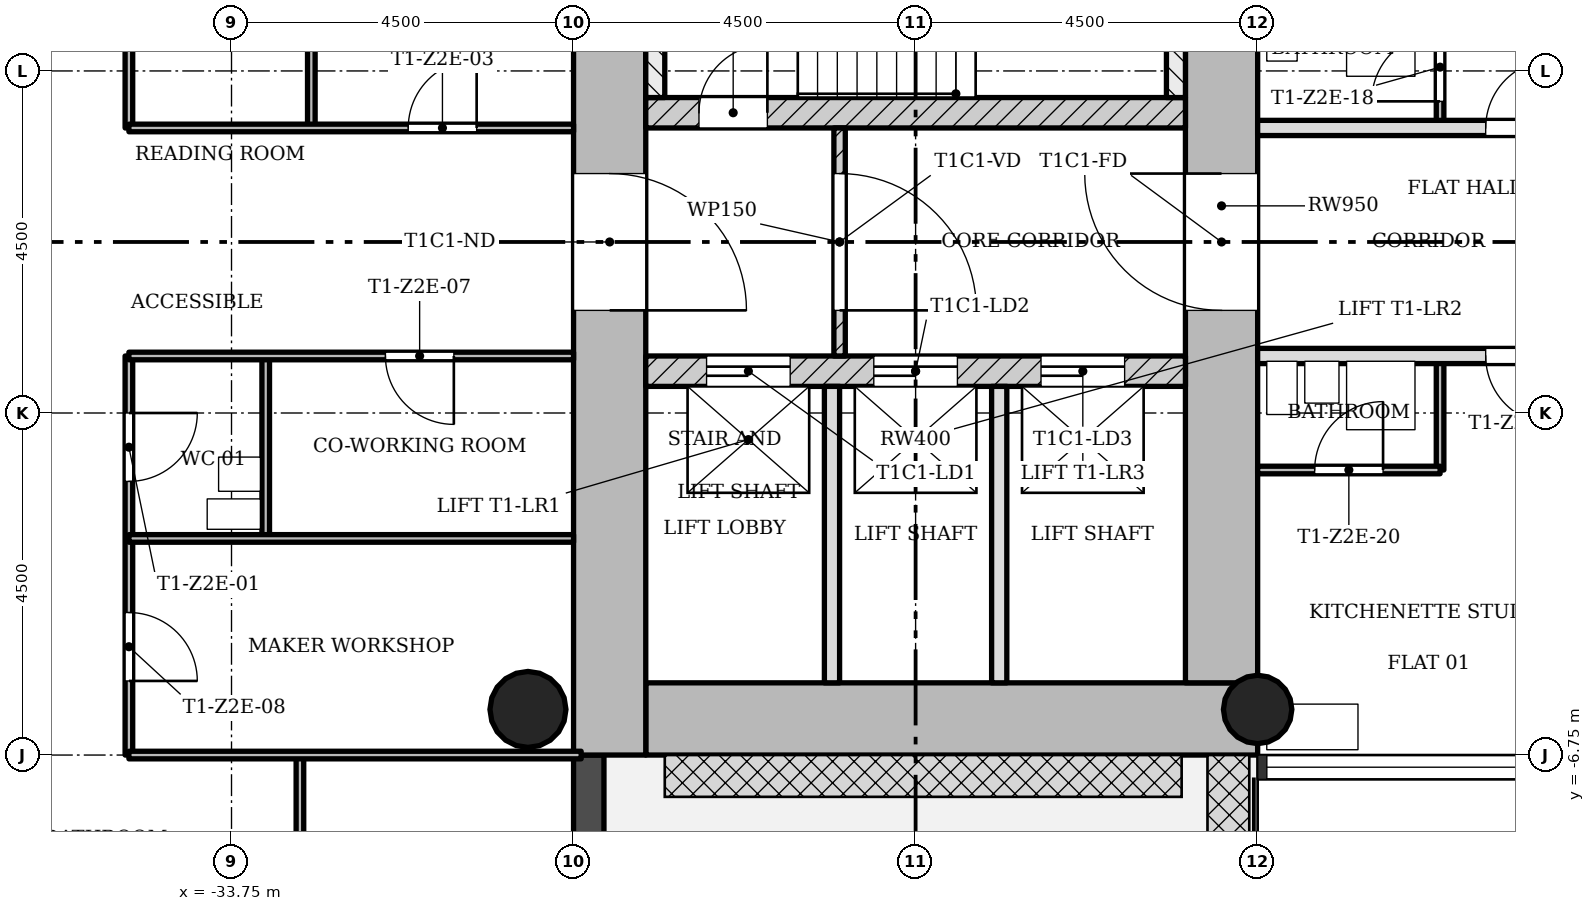
"""IFC4 building model, lengths in metres.
Left out: names, types, materials, properties, quantities, classifications, styles, units other than length and angle.
Written with IfcOpenShell. Run it as: python <this file> out.ifc"""

import sys

from ifc_helpers import new_model, si_unit, direction, frame, frame_2d, origin, origin_2d, place, context, subcontext, project, spatial, rectangle, hollow_circle, extrude, element, fill, save


model = new_model("IFC4")
c1 = context("Model", 3, precision=1e-05, world=origin(), true_north=direction((0.0, 1.0)))
c2 = subcontext(c1, "Body", "Model", "MODEL_VIEW")
j1 = project(units=[si_unit("LENGTHUNIT", "METRE"), si_unit("PLANEANGLEUNIT", "RADIAN")], contexts=[c1])
p1 = place(None, origin())
s1 = spatial("IfcSite", under=j1, at=p1, CompositionType="ELEMENT")
p2 = place(p1, origin())
s2 = spatial("IfcBuilding", under=s1, at=p2, CompositionType="ELEMENT")
p3 = place(p2, frame((0.0, 0.0, 103.8)))
s3 = spatial("IfcBuildingStorey", under=s2, at=p3, CompositionType="ELEMENT", Elevation=103.8)
p4 = place(p3, frame((-28.3, -6.275, 0.0), z_axis=(0.0, 0.0, 1.0), x_axis=(1.0, 0.0, 0.0)))
e1 = element("IfcWall", 1, at=p4, inside=s3, PredefinedType="SHEAR", context=c2, shape_type="SweptSolid", body=[
    extrude(rectangle(XDim=8.05, YDim=0.95, at=frame_2d((4.025, 0.0))), origin(), (0.0, 0.0, 1.0), 3.4),
])
p5 = place(p3, frame((-20.725, -5.8, 0.0), z_axis=(0.0, 0.0, 1.0), x_axis=(0.0, 1.0, 0.0)))
e2 = element("IfcWall", 2, at=p5, inside=s3, PredefinedType="SHEAR", context=c2, shape_type="SweptSolid", body=[
    extrude(rectangle(XDim=12.55, YDim=0.95, at=frame_2d((6.275, 0.0))), origin(), (0.0, 0.0, 1.0), 3.4),
])
p6 = place(p5, frame((4.9, 0.0, 0.0)))
e3 = element("IfcOpeningElement", 3, at=p6, cuts=e2, PredefinedType="OPENING", context=c2, shape_type="SweptSolid", body=[
    extrude(rectangle(XDim=1.8, YDim=2.1, at=frame_2d((0.9, 1.05))), frame((0.0, 0.485, 0.0), z_axis=(0.0, -1.0, 0.0), x_axis=(1.0, 0.0, 0.0)), (0.0, 0.0, 1.0), 0.97),
])
p7 = place(p3, frame((-28.775, 5.8, 0.0), z_axis=(0.0, 0.0, 1.0), x_axis=(0.0, -1.0, 0.0)))
e4 = element("IfcWall", 4, at=p7, inside=s3, PredefinedType="SHEAR", context=c2, shape_type="SweptSolid", body=[
    extrude(rectangle(XDim=12.55, YDim=0.95, at=frame_2d((6.275, 0.0))), origin(), (0.0, 0.0, 1.0), 3.4),
])
p8 = place(p7, frame((4.9, 0.0, 0.0)))
e5 = element("IfcOpeningElement", 5, at=p8, cuts=e4, PredefinedType="OPENING", context=c2, shape_type="SweptSolid", body=[
    extrude(rectangle(XDim=1.8, YDim=2.1, at=frame_2d((0.9, 1.05))), frame((0.0, 0.485, 0.0), z_axis=(0.0, -1.0, 0.0), x_axis=(1.0, 0.0, 0.0)), (0.0, 0.0, 1.0), 0.97),
])
p9 = place(p3, frame((-28.3, -1.7, 0.0), z_axis=(0.0, 0.0, 1.0), x_axis=(1.0, 0.0, 0.0)))
e6 = element("IfcWall", 6, at=p9, inside=s3, PredefinedType="SHEAR", context=c2, shape_type="SweptSolid", body=[
    extrude(rectangle(XDim=7.1, YDim=0.4, at=frame_2d((3.55, 0.0))), origin(), (0.0, 0.0, 1.0), 3.4),
])
p10 = place(p9, frame((0.8, 0.0, 0.0)))
e7 = element("IfcOpeningElement", 7, at=p10, cuts=e6, PredefinedType="OPENING", context=c2, shape_type="SweptSolid", body=[
    extrude(rectangle(XDim=1.1, YDim=2.1, at=frame_2d((0.55, 1.05))), frame((0.0, 0.21, 0.0), z_axis=(0.0, -1.0, 0.0), x_axis=(1.0, 0.0, 0.0)), (0.0, 0.0, 1.0), 0.42),
])
p11 = place(p9, frame((3.0, 0.0, 0.0)))
e8 = element("IfcOpeningElement", 8, at=p11, cuts=e6, PredefinedType="OPENING", context=c2, shape_type="SweptSolid", body=[
    extrude(rectangle(XDim=1.1, YDim=2.1, at=frame_2d((0.55, 1.05))), frame((0.0, 0.21, 0.0), z_axis=(0.0, -1.0, 0.0), x_axis=(1.0, 0.0, 0.0)), (0.0, 0.0, 1.0), 0.42),
])
p12 = place(p9, frame((5.2, 0.0, 0.0)))
e9 = element("IfcOpeningElement", 9, at=p12, cuts=e6, PredefinedType="OPENING", context=c2, shape_type="SweptSolid", body=[
    extrude(rectangle(XDim=1.1, YDim=2.1, at=frame_2d((0.55, 1.05))), frame((0.0, 0.21, 0.0), z_axis=(0.0, -1.0, 0.0), x_axis=(1.0, 0.0, 0.0)), (0.0, 0.0, 1.0), 0.42),
])
p13 = place(p3, frame((-28.3, 1.7, 0.0), z_axis=(0.0, 0.0, 1.0), x_axis=(1.0, 0.0, 0.0)))
e10 = element("IfcWall", 10, at=p13, inside=s3, PredefinedType="SHEAR", context=c2, shape_type="SweptSolid", body=[
    extrude(rectangle(XDim=7.1, YDim=0.4, at=frame_2d((3.55, 0.0))), origin(), (0.0, 0.0, 1.0), 3.4),
])
p14 = place(p13, frame((0.7, 0.0, 0.0)))
e11 = element("IfcOpeningElement", 11, at=p14, cuts=e10, PredefinedType="OPENING", context=c2, shape_type="SweptSolid", body=[
    extrude(rectangle(XDim=0.9, YDim=2.1, at=frame_2d((0.45, 1.05))), frame((0.0, 0.21, 0.0), z_axis=(0.0, -1.0, 0.0), x_axis=(1.0, 0.0, 0.0)), (0.0, 0.0, 1.0), 0.42),
])
p15 = place(p3, frame((-20.25, -6.15, 0.0), z_axis=(0.0, 0.0, 1.0), x_axis=(1.0, 0.0, 0.0)))
e12 = element("IfcColumn", 12, at=p15, inside=s3, PredefinedType="COLUMN", context=c2, shape_type="SweptSolid", body=[
    extrude(hollow_circle(Radius=0.45, WallThickness=0.032, at=origin_2d()), origin(), (0.0, 0.0, 1.0), 3.4),
])
p16 = place(p3, frame((-29.85, -6.15, 0.0), z_axis=(0.0, 0.0, 1.0), x_axis=(1.0, 0.0, 0.0)))
e13 = element("IfcColumn", 13, at=p16, inside=s3, PredefinedType="COLUMN", context=c2, shape_type="SweptSolid", body=[
    extrude(hollow_circle(Radius=0.5, WallThickness=0.036, at=origin_2d()), origin(), (0.0, 0.0, 1.0), 3.4),
])
p17 = place(p3, frame((-29.05, -11.25, -0.02), z_axis=(0.0, 0.0, 1.0), x_axis=(0.0, 1.0, 0.0)))
e14 = element("IfcWall", 14, at=p17, inside=s3, PredefinedType="STANDARD", context=c2, shape_type="SweptSolid", body=[
    extrude(rectangle(XDim=4.5, YDim=0.4, at=frame_2d((2.25, 0.0))), origin(), (0.0, 0.0, 1.0), 3.12),
])
p18 = place(p17, frame((1.35, 0.0, 0.02)))
e15 = element("IfcOpeningElement", 15, at=p18, cuts=e14, PredefinedType="OPENING", context=c2, shape_type="SweptSolid", body=[
    extrude(rectangle(XDim=1.8, YDim=2.1, at=frame_2d((0.9, 1.05))), frame((0.0, 0.21, 0.0), z_axis=(0.0, -1.0, 0.0), x_axis=(1.0, 0.0, 0.0)), (0.0, 0.0, 1.0), 0.42),
])
p19 = place(p3, frame((-25.75, -1.5, 0.0), z_axis=(0.0, 0.0, 1.0), x_axis=(0.0, 1.0, 0.0)))
e16 = element("IfcWall", 16, at=p19, inside=s3, PredefinedType="PARTITIONING", context=c2, shape_type="SweptSolid", body=[
    extrude(rectangle(XDim=3.0, YDim=0.15, at=frame_2d((1.5, 0.0))), origin(), (0.0, 0.0, 1.0), 3.0),
])
p20 = place(p19, frame((0.6, 0.0, 0.0)))
e17 = element("IfcOpeningElement", 17, at=p20, cuts=e16, PredefinedType="OPENING", context=c2, shape_type="SweptSolid", body=[
    extrude(rectangle(XDim=1.8, YDim=2.1, at=frame_2d((0.9, 1.05))), frame((0.0, 0.085, 0.0), z_axis=(0.0, -1.0, 0.0), x_axis=(1.0, 0.0, 0.0)), (0.0, 0.0, 1.0), 0.17),
])
for number, where, z_axis, x_axis in (
    (18, (-25.85, -5.8, 0.0), (0.0, 0.0, 1.0), (0.0, 1.0, 0.0)),
    (19, (-23.65, -5.8, 0.0), (0.0, 0.0, 1.0), (0.0, 1.0, 0.0)),
):
    element("IfcWall", number, at=place(p3, frame(where, z_axis=z_axis, x_axis=x_axis)), inside=s3, PredefinedType="SOLIDWALL", context=c2, shape_type="SweptSolid", body=[
        extrude(rectangle(XDim=3.9, YDim=0.2, at=frame_2d((1.95, 0.0))), origin(), (0.0, 0.0, 1.0), 3.0),
    ])
p21 = place(p3, frame((-35.1, -6.75, 0.0), z_axis=(0.0, 0.0, 1.0), x_axis=(0.0, 1.0, 0.0)))
e20 = element("IfcWall", 20, at=p21, inside=s3, PredefinedType="PARTITIONING", context=c2, shape_type="SweptSolid", body=[
    extrude(rectangle(XDim=5.25, YDim=0.1, at=frame_2d((2.625, 0.0))), origin(), (0.0, 0.0, 1.0), 3.0),
])
p22 = place(p21, frame((3.6, 0.0, 0.0)))
e21 = element("IfcOpeningElement", 21, at=p22, cuts=e20, PredefinedType="OPENING", context=c2, shape_type="SweptSolid", body=[
    extrude(rectangle(XDim=0.9, YDim=2.1, at=frame_2d((0.45, 1.05))), frame((0.0, 0.06, 0.0), z_axis=(0.0, -1.0, 0.0), x_axis=(1.0, 0.0, 0.0)), (0.0, 0.0, 1.0), 0.12),
])
p23 = place(p21, frame((0.975, 0.0, 0.0)))
e22 = element("IfcOpeningElement", 22, at=p23, cuts=e20, PredefinedType="OPENING", context=c2, shape_type="SweptSolid", body=[
    extrude(rectangle(XDim=0.9, YDim=2.1, at=frame_2d((0.45, 1.05))), frame((0.0, 0.06, 0.0), z_axis=(0.0, -1.0, 0.0), x_axis=(1.0, 0.0, 0.0)), (0.0, 0.0, 1.0), 0.12),
])
p24 = place(p3, frame((-35.1, 1.5, 0.0), z_axis=(0.0, 0.0, 1.0), x_axis=(0.0, 1.0, 0.0)))
e23 = element("IfcWall", 23, at=p24, inside=s3, PredefinedType="PARTITIONING", context=c2, shape_type="SweptSolid", body=[
    extrude(rectangle(XDim=5.25, YDim=0.1, at=frame_2d((2.625, 0.0))), origin(), (0.0, 0.0, 1.0), 3.0),
])
p25 = place(p24, frame((2.175, 0.0, 0.0)))
e24 = element("IfcOpeningElement", 24, at=p25, cuts=e23, PredefinedType="OPENING", context=c2, shape_type="SweptSolid", body=[
    extrude(rectangle(XDim=0.9, YDim=2.1, at=frame_2d((0.45, 1.05))), frame((0.0, 0.06, 0.0), z_axis=(0.0, -1.0, 0.0), x_axis=(1.0, 0.0, 0.0)), (0.0, 0.0, 1.0), 0.12),
])
p26 = place(p3, frame((-33.3, -3.9, 0.0), z_axis=(0.0, 0.0, 1.0), x_axis=(0.0, 1.0, 0.0)))
e25 = element("IfcWall", 25, at=p26, inside=s3, PredefinedType="PARTITIONING", context=c2, shape_type="SweptSolid", body=[
    extrude(rectangle(XDim=2.4, YDim=0.1, at=frame_2d((1.2, 0.0))), origin(), (0.0, 0.0, 1.0), 3.0),
])
p27 = place(p3, frame((-32.85, -15.75, 0.0), z_axis=(0.0, 0.0, 1.0), x_axis=(0.0, 1.0, 0.0)))
e26 = element("IfcWall", 26, at=p27, inside=s3, PredefinedType="PARTITIONING", context=c2, shape_type="SweptSolid", body=[
    extrude(rectangle(XDim=9.0, YDim=0.1, at=frame_2d((4.5, 0.0))), origin(), (0.0, 0.0, 1.0), 3.0),
])
p28 = place(p27, frame((5.55, 0.0, 0.0)))
e27 = element("IfcOpeningElement", 27, at=p28, cuts=e26, PredefinedType="OPENING", context=c2, shape_type="SweptSolid", body=[
    extrude(rectangle(XDim=0.9, YDim=2.1, at=frame_2d((0.45, 1.05))), frame((0.0, 0.06, 0.0), z_axis=(0.0, -1.0, 0.0), x_axis=(1.0, 0.0, 0.0)), (0.0, 0.0, 1.0), 0.12),
])
p29 = place(p3, frame((-32.7, 1.5, 0.0), z_axis=(0.0, 0.0, 1.0), x_axis=(0.0, 1.0, 0.0)))
e28 = element("IfcWall", 28, at=p29, inside=s3, PredefinedType="PARTITIONING", context=c2, shape_type="SweptSolid", body=[
    extrude(rectangle(XDim=5.25, YDim=0.1, at=frame_2d((2.625, 0.0))), origin(), (0.0, 0.0, 1.0), 3.0),
])
p30 = place(p3, frame((-17.85, -3.0, 0.0), z_axis=(0.0, 0.0, 1.0), x_axis=(0.0, 1.0, 0.0)))
e29 = element("IfcWall", 29, at=p30, inside=s3, PredefinedType="PARTITIONING", context=c2, shape_type="SweptSolid", body=[
    extrude(rectangle(XDim=1.5, YDim=0.1, at=frame_2d((0.75, 0.0))), origin(), (0.0, 0.0, 1.0), 3.0),
])
p31 = place(p3, frame((-17.85, 1.5, 0.0), z_axis=(0.0, 0.0, 1.0), x_axis=(0.0, 1.0, 0.0)))
e30 = element("IfcWall", 30, at=p31, inside=s3, PredefinedType="PARTITIONING", context=c2, shape_type="SweptSolid", body=[
    extrude(rectangle(XDim=1.65, YDim=0.1, at=frame_2d((0.825, 0.0))), origin(), (0.0, 0.0, 1.0), 3.0),
])
p32 = place(p31, frame((0.35, 0.0, 0.0)))
e31 = element("IfcOpeningElement", 31, at=p32, cuts=e30, PredefinedType="OPENING", context=c2, shape_type="SweptSolid", body=[
    extrude(rectangle(XDim=0.9, YDim=2.1, at=frame_2d((0.45, 1.05))), frame((0.0, 0.06, 0.0), z_axis=(0.0, -1.0, 0.0), x_axis=(1.0, 0.0, 0.0)), (0.0, 0.0, 1.0), 0.12),
])
p33 = place(p3, frame((-35.1, -6.75, 0.0), z_axis=(0.0, 0.0, 1.0), x_axis=(1.0, 0.0, 0.0)))
e32 = element("IfcWall", 32, at=p33, inside=s3, PredefinedType="PARTITIONING", context=c2, shape_type="SweptSolid", body=[
    extrude(rectangle(XDim=5.95, YDim=0.1, at=frame_2d((2.975, 0.0))), origin(), (0.0, 0.0, 1.0), 3.0),
])
p34 = place(p3, frame((-35.1, -3.9, 0.0), z_axis=(0.0, 0.0, 1.0), x_axis=(1.0, 0.0, 0.0)))
e33 = element("IfcWall", 33, at=p34, inside=s3, PredefinedType="PARTITIONING", context=c2, shape_type="SweptSolid", body=[
    extrude(rectangle(XDim=5.85, YDim=0.1, at=frame_2d((2.925, 0.0))), origin(), (0.0, 0.0, 1.0), 3.0),
])
p35 = place(p3, frame((-20.25, -3.0, 0.0), z_axis=(0.0, 0.0, 1.0), x_axis=(1.0, 0.0, 0.0)))
e34 = element("IfcWall", 34, at=p35, inside=s3, PredefinedType="PARTITIONING", context=c2, shape_type="SweptSolid", body=[
    extrude(rectangle(XDim=2.4, YDim=0.1, at=frame_2d((1.2, 0.0))), origin(), (0.0, 0.0, 1.0), 3.0),
])
p36 = place(p35, frame((0.75, 0.0, 0.0)))
e35 = element("IfcOpeningElement", 35, at=p36, cuts=e34, PredefinedType="OPENING", context=c2, shape_type="SweptSolid", body=[
    extrude(rectangle(XDim=0.9, YDim=2.1, at=frame_2d((0.45, 1.05))), frame((0.0, 0.06, 0.0), z_axis=(0.0, -1.0, 0.0), x_axis=(1.0, 0.0, 0.0)), (0.0, 0.0, 1.0), 0.12),
])
p37 = place(p3, frame((-35.1, -1.5, 0.0), z_axis=(0.0, 0.0, 1.0), x_axis=(1.0, 0.0, 0.0)))
e36 = element("IfcWall", 36, at=p37, inside=s3, PredefinedType="PARTITIONING", context=c2, shape_type="SweptSolid", body=[
    extrude(rectangle(XDim=5.85, YDim=0.1, at=frame_2d((2.925, 0.0))), origin(), (0.0, 0.0, 1.0), 3.0),
])
p38 = place(p37, frame((3.375, 0.0, 0.0)))
e37 = element("IfcOpeningElement", 37, at=p38, cuts=e36, PredefinedType="OPENING", context=c2, shape_type="SweptSolid", body=[
    extrude(rectangle(XDim=0.9, YDim=2.1, at=frame_2d((0.45, 1.05))), frame((0.0, 0.06, 0.0), z_axis=(0.0, -1.0, 0.0), x_axis=(1.0, 0.0, 0.0)), (0.0, 0.0, 1.0), 0.12),
])
p39 = place(p3, frame((-20.25, -1.5, 0.0), z_axis=(0.0, 0.0, 1.0), x_axis=(1.0, 0.0, 0.0)))
e38 = element("IfcWall", 38, at=p39, inside=s3, PredefinedType="SOLIDWALL", context=c2, shape_type="SweptSolid", body=[
    extrude(rectangle(XDim=4.5, YDim=0.2, at=frame_2d((2.25, 0.0))), origin(), (0.0, 0.0, 1.0), 3.0),
])
p40 = place(p39, frame((3.0, 0.0, 0.0)))
e39 = element("IfcOpeningElement", 39, at=p40, cuts=e38, PredefinedType="OPENING", context=c2, shape_type="SweptSolid", body=[
    extrude(rectangle(XDim=0.9, YDim=2.1, at=frame_2d((0.45, 1.05))), frame((0.0, 0.11, 0.0), z_axis=(0.0, -1.0, 0.0), x_axis=(1.0, 0.0, 0.0)), (0.0, 0.0, 1.0), 0.22),
])
p41 = place(p3, frame((-35.1, 1.5, 0.0), z_axis=(0.0, 0.0, 1.0), x_axis=(1.0, 0.0, 0.0)))
e40 = element("IfcWall", 40, at=p41, inside=s3, PredefinedType="PARTITIONING", context=c2, shape_type="SweptSolid", body=[
    extrude(rectangle(XDim=5.85, YDim=0.1, at=frame_2d((2.925, 0.0))), origin(), (0.0, 0.0, 1.0), 3.0),
])
p42 = place(p41, frame((3.675, 0.0, 0.0)))
e41 = element("IfcOpeningElement", 41, at=p42, cuts=e40, PredefinedType="OPENING", context=c2, shape_type="SweptSolid", body=[
    extrude(rectangle(XDim=0.9, YDim=2.1, at=frame_2d((0.45, 1.05))), frame((0.0, 0.06, 0.0), z_axis=(0.0, -1.0, 0.0), x_axis=(1.0, 0.0, 0.0)), (0.0, 0.0, 1.0), 0.12),
])
p43 = place(p3, frame((-20.25, 1.5, 0.0), z_axis=(0.0, 0.0, 1.0), x_axis=(1.0, 0.0, 0.0)))
e42 = element("IfcWall", 42, at=p43, inside=s3, PredefinedType="SOLIDWALL", context=c2, shape_type="SweptSolid", body=[
    extrude(rectangle(XDim=4.5, YDim=0.2, at=frame_2d((2.25, 0.0))), origin(), (0.0, 0.0, 1.0), 3.0),
])
p44 = place(p43, frame((3.0, 0.0, 0.0)))
e43 = element("IfcOpeningElement", 43, at=p44, cuts=e42, PredefinedType="OPENING", context=c2, shape_type="SweptSolid", body=[
    extrude(rectangle(XDim=0.9, YDim=2.1, at=frame_2d((0.45, 1.05))), frame((0.0, 0.11, 0.0), z_axis=(0.0, -1.0, 0.0), x_axis=(1.0, 0.0, 0.0)), (0.0, 0.0, 1.0), 0.22),
])
for number, where, z_axis, x_axis in (
    (44, (-21.325, 1.9, 0.0), (0.0, 0.0, 1.0), (0.0, 1.0, 0.0)),
    (45, (-28.175, 1.9, 0.0), (0.0, 0.0, 1.0), (0.0, 1.0, 0.0)),
):
    element("IfcWall", number, at=place(p3, frame(where, z_axis=z_axis, x_axis=x_axis)), inside=s3, PredefinedType="SHEAR", context=c2, shape_type="SweptSolid", body=[
        extrude(rectangle(XDim=3.9, YDim=0.25, at=frame_2d((1.95, 0.0))), origin(), (0.0, 0.0, 1.0), 3.4),
    ])
p45 = place(p20, origin())
e46 = element("IfcDoor", 46, at=p45, inside=s3, OperationType="SINGLE_SWING_LEFT", PredefinedType="DOOR", context=c2, shape_type="SweptSolid", body=[
    extrude(rectangle(XDim=1.8, YDim=2.1, at=frame_2d((0.9, 1.05))), frame((0.0, 0.025, 0.0), z_axis=(0.0, -1.0, 0.0), x_axis=(1.0, 0.0, 0.0)), (0.0, 0.0, 1.0), 0.05),
])
fill(e17, e46)
p46 = place(p22, origin())
e47 = element("IfcDoor", 47, at=p46, inside=s3, OperationType="SINGLE_SWING_RIGHT", PredefinedType="DOOR", context=c2, shape_type="SweptSolid", body=[
    extrude(rectangle(XDim=0.9, YDim=2.1, at=frame_2d((0.45, 1.05))), frame((0.0, 0.025, 0.0), z_axis=(0.0, -1.0, 0.0), x_axis=(1.0, 0.0, 0.0)), (0.0, 0.0, 1.0), 0.05),
])
fill(e21, e47)
p47 = place(p42, origin())
e48 = element("IfcDoor", 48, at=p47, inside=s3, OperationType="SINGLE_SWING_LEFT", PredefinedType="DOOR", context=c2, shape_type="SweptSolid", body=[
    extrude(rectangle(XDim=0.9, YDim=2.1, at=frame_2d((0.45, 1.05))), frame((0.0, 0.025, 0.0), z_axis=(0.0, -1.0, 0.0), x_axis=(1.0, 0.0, 0.0)), (0.0, 0.0, 1.0), 0.05),
])
fill(e41, e48)
p48 = place(p38, origin())
e49 = element("IfcDoor", 49, at=p48, inside=s3, OperationType="SINGLE_SWING_RIGHT", PredefinedType="DOOR", context=c2, shape_type="SweptSolid", body=[
    extrude(rectangle(XDim=0.9, YDim=2.1, at=frame_2d((0.45, 1.05))), frame((0.0, 0.025, 0.0), z_axis=(0.0, -1.0, 0.0), x_axis=(1.0, 0.0, 0.0)), (0.0, 0.0, 1.0), 0.05),
])
fill(e37, e49)
p49 = place(p23, origin())
e50 = element("IfcDoor", 50, at=p49, inside=s3, OperationType="SINGLE_SWING_LEFT", PredefinedType="DOOR", context=c2, shape_type="SweptSolid", body=[
    extrude(rectangle(XDim=0.9, YDim=2.1, at=frame_2d((0.45, 1.05))), frame((0.0, 0.025, 0.0), z_axis=(0.0, -1.0, 0.0), x_axis=(1.0, 0.0, 0.0)), (0.0, 0.0, 1.0), 0.05),
])
fill(e22, e50)
p50 = place(p44, origin())
e51 = element("IfcDoor", 51, at=p50, inside=s3, OperationType="SINGLE_SWING_LEFT", PredefinedType="DOOR", context=c2, shape_type="SweptSolid", body=[
    extrude(rectangle(XDim=0.9, YDim=2.1, at=frame_2d((0.45, 1.05))), frame((0.0, 0.025, 0.0), z_axis=(0.0, -1.0, 0.0), x_axis=(1.0, 0.0, 0.0)), (0.0, 0.0, 1.0), 0.05),
])
fill(e43, e51)
p51 = place(p32, origin())
e52 = element("IfcDoor", 52, at=p51, inside=s3, OperationType="SINGLE_SWING_RIGHT", PredefinedType="DOOR", context=c2, shape_type="SweptSolid", body=[
    extrude(rectangle(XDim=0.9, YDim=2.1, at=frame_2d((0.45, 1.05))), frame((0.0, 0.025, 0.0), z_axis=(0.0, -1.0, 0.0), x_axis=(1.0, 0.0, 0.0)), (0.0, 0.0, 1.0), 0.05),
])
fill(e31, e52)
p52 = place(p40, origin())
e53 = element("IfcDoor", 53, at=p52, inside=s3, OperationType="SINGLE_SWING_RIGHT", PredefinedType="DOOR", context=c2, shape_type="SweptSolid", body=[
    extrude(rectangle(XDim=0.9, YDim=2.1, at=frame_2d((0.45, 1.05))), frame((0.0, 0.025, 0.0), z_axis=(0.0, -1.0, 0.0), x_axis=(1.0, 0.0, 0.0)), (0.0, 0.0, 1.0), 0.05),
])
fill(e39, e53)
p53 = place(p36, origin())
e54 = element("IfcDoor", 54, at=p53, inside=s3, OperationType="SINGLE_SWING_LEFT", PredefinedType="DOOR", context=c2, shape_type="SweptSolid", body=[
    extrude(rectangle(XDim=0.9, YDim=2.1, at=frame_2d((0.45, 1.05))), frame((0.0, 0.025, 0.0), z_axis=(0.0, -1.0, 0.0), x_axis=(1.0, 0.0, 0.0)), (0.0, 0.0, 1.0), 0.05),
])
fill(e35, e54)
p54 = place(p14, origin())
e55 = element("IfcDoor", 55, at=p54, inside=s3, OperationType="SINGLE_SWING_LEFT", PredefinedType="DOOR", context=c2, shape_type="SweptSolid", body=[
    extrude(rectangle(XDim=0.9, YDim=2.1, at=frame_2d((0.45, 1.05))), frame((0.0, 0.025, 0.0), z_axis=(0.0, -1.0, 0.0), x_axis=(1.0, 0.0, 0.0)), (0.0, 0.0, 1.0), 0.05),
])
fill(e11, e55)
p55 = place(p10, origin())
e56 = element("IfcDoor", 56, at=p55, inside=s3, OperationType="SLIDING_TO_LEFT", PredefinedType="DOOR", context=c2, shape_type="SweptSolid", body=[
    extrude(rectangle(XDim=1.1, YDim=2.1, at=frame_2d((0.55, 1.05))), frame((0.0, 0.025, 0.0), z_axis=(0.0, -1.0, 0.0), x_axis=(1.0, 0.0, 0.0)), (0.0, 0.0, 1.0), 0.05),
])
fill(e7, e56)
p56 = place(p11, origin())
e57 = element("IfcDoor", 57, at=p56, inside=s3, OperationType="SLIDING_TO_LEFT", PredefinedType="DOOR", context=c2, shape_type="SweptSolid", body=[
    extrude(rectangle(XDim=1.1, YDim=2.1, at=frame_2d((0.55, 1.05))), frame((0.0, 0.025, 0.0), z_axis=(0.0, -1.0, 0.0), x_axis=(1.0, 0.0, 0.0)), (0.0, 0.0, 1.0), 0.05),
])
fill(e8, e57)
p57 = place(p12, origin())
e58 = element("IfcDoor", 58, at=p57, inside=s3, OperationType="SLIDING_TO_LEFT", PredefinedType="DOOR", context=c2, shape_type="SweptSolid", body=[
    extrude(rectangle(XDim=1.1, YDim=2.1, at=frame_2d((0.55, 1.05))), frame((0.0, 0.025, 0.0), z_axis=(0.0, -1.0, 0.0), x_axis=(1.0, 0.0, 0.0)), (0.0, 0.0, 1.0), 0.05),
])
fill(e9, e58)
p58 = place(p8, origin())
e59 = element("IfcDoor", 59, at=p58, inside=s3, OperationType="SINGLE_SWING_LEFT", PredefinedType="DOOR", context=c2, shape_type="SweptSolid", body=[
    extrude(rectangle(XDim=1.8, YDim=2.1, at=frame_2d((0.9, 1.05))), frame((0.0, 0.025, 0.0), z_axis=(0.0, -1.0, 0.0), x_axis=(1.0, 0.0, 0.0)), (0.0, 0.0, 1.0), 0.05),
])
fill(e5, e59)
p59 = place(p6, origin())
e60 = element("IfcDoor", 60, at=p59, inside=s3, OperationType="SINGLE_SWING_LEFT", PredefinedType="DOOR", context=c2, shape_type="SweptSolid", body=[
    extrude(rectangle(XDim=1.8, YDim=2.1, at=frame_2d((0.9, 1.05))), frame((0.0, 0.025, 0.0), z_axis=(0.0, -1.0, 0.0), x_axis=(1.0, 0.0, 0.0)), (0.0, 0.0, 1.0), 0.05),
])
fill(e3, e60)
save(model, sys.argv[1])
